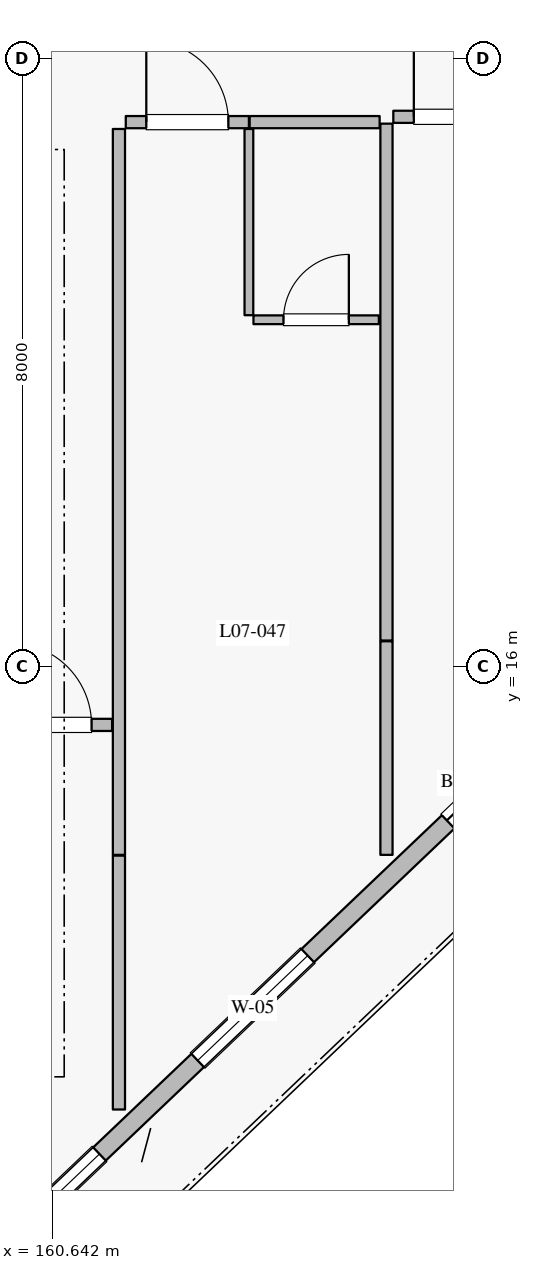
"""IFC4 building model, lengths in metres.
Left out: names, types, materials, properties, quantities, classifications, styles, units other than length and angle.
Written with IfcOpenShell. Run it as: python <this file> out.ifc"""

import sys

from ifc_helpers import new_model, si_unit, direction, frame, frame_2d, origin, place, context, subcontext, project, spatial, rectangle, extrude, element, fill, save


model = new_model("IFC4")
c1 = context("Model", 3, precision=1e-05, world=origin(), true_north=direction((0.0, 1.0)))
c2 = subcontext(c1, "Body", "Model", "MODEL_VIEW")
j1 = project(units=[si_unit("LENGTHUNIT", "METRE"), si_unit("PLANEANGLEUNIT", "RADIAN")], contexts=[c1])
p1 = place(None, origin())
s1 = spatial("IfcSite", under=j1, at=p1, CompositionType="ELEMENT")
p2 = place(p1, origin())
s2 = spatial("IfcBuilding", under=s1, at=p2, CompositionType="ELEMENT")
p3 = place(p2, frame((0.0, 0.0, 32.4)))
s3 = spatial("IfcBuildingStorey", under=s2, at=p3, CompositionType="ELEMENT", Elevation=32.4)
p4 = place(p3, frame((167.65, 15.667, 0.0), z_axis=(0.0, 0.0, 1.0), x_axis=(-0.724105170588, -0.689689569247, 0.0)))
e1 = element("IfcWall", 1, at=p4, inside=s3, PredefinedType="SOLIDWALL", context=c2, shape_type="SweptSolid", body=[
    extrude(rectangle(XDim=10.634, YDim=0.24, at=frame_2d((5.317, 0.0))), origin(), (0.0, 0.0, 1.0), 2.89),
])
p5 = place(p4, frame((0.983, 0.0, 0.0)))
e2 = element("IfcOpeningElement", 2, at=p5, cuts=e1, PredefinedType="OPENING", context=c2, shape_type="SweptSolid", body=[
    extrude(rectangle(XDim=1.5, YDim=2.25, at=frame_2d((0.75, 1.125))), frame((0.0, 0.13, 0.0), z_axis=(0.0, -1.0, 0.0), x_axis=(1.0, 0.0, 0.0)), (0.0, 0.0, 1.0), 0.26),
])
p6 = place(p4, frame((5.035, 0.0, 0.8)))
e3 = element("IfcOpeningElement", 3, at=p6, cuts=e1, PredefinedType="OPENING", context=c2, shape_type="SweptSolid", body=[
    extrude(rectangle(XDim=2.0, YDim=1.75, at=frame_2d((1.0, 0.875))), frame((0.0, 0.13, 0.0), z_axis=(0.0, -1.0, 0.0), x_axis=(1.0, 0.0, 0.0)), (0.0, 0.0, 1.0), 0.26),
])
p7 = place(p4, frame((8.819, 0.0, 0.8)))
e4 = element("IfcOpeningElement", 4, at=p7, cuts=e1, PredefinedType="OPENING", context=c2, shape_type="SweptSolid", body=[
    extrude(rectangle(XDim=1.6, YDim=1.6, at=frame_2d((0.8, 0.8))), frame((0.0, 0.13, 0.0), z_axis=(0.0, -1.0, 0.0), x_axis=(1.0, 0.0, 0.0)), (0.0, 0.0, 1.0), 0.26),
])
p8 = place(p3, frame((159.81, 15.23, 0.0), z_axis=(0.0, 0.0, 1.0), x_axis=(1.0, 0.0, 0.0)))
e5 = element("IfcWall", 5, at=p8, inside=s3, PredefinedType="PARTITIONING", context=c2, shape_type="SweptSolid", body=[
    extrude(rectangle(XDim=1.62, YDim=0.16, at=frame_2d((0.81, 0.0))), origin(), (0.0, 0.0, 1.0), 3.335),
])
p9 = place(p8, frame((0.27, 0.0, 0.0)))
e6 = element("IfcOpeningElement", 6, at=p9, cuts=e5, PredefinedType="OPENING", context=c2, shape_type="SweptSolid", body=[
    extrude(rectangle(XDim=1.08, YDim=2.3, at=frame_2d((0.54, 1.15))), frame((0.0, 0.09, 0.0), z_axis=(0.0, -1.0, 0.0), x_axis=(1.0, 0.0, 0.0)), (0.0, 0.0, 1.0), 0.18),
])
p10 = place(p3, frame((161.52, 10.17, 0.0), z_axis=(0.0, 0.0, 1.0), x_axis=(0.0, 1.0, 0.0)))
e7 = element("IfcWall", 7, at=p10, inside=s3, PredefinedType="PARTITIONING", context=c2, shape_type="SweptSolid", body=[
    extrude(rectangle(XDim=3.34, YDim=0.16, at=frame_2d((1.67, 0.0))), origin(), (0.0, 0.0, 1.0), 3.335),
])
p11 = place(p3, frame((161.61, 23.16, 0.0), z_axis=(0.0, 0.0, 1.0), x_axis=(1.0, 0.0, 0.0)))
e8 = element("IfcWall", 8, at=p11, inside=s3, PredefinedType="PARTITIONING", context=c2, shape_type="SweptSolid", body=[
    extrude(rectangle(XDim=1.62, YDim=0.16, at=frame_2d((0.81, 0.0))), origin(), (0.0, 0.0, 1.0), 3.335),
])
p12 = place(p11, frame((0.27, 0.0, 0.0)))
e9 = element("IfcOpeningElement", 9, at=p12, cuts=e8, PredefinedType="OPENING", context=c2, shape_type="SweptSolid", body=[
    extrude(rectangle(XDim=1.08, YDim=2.3, at=frame_2d((0.54, 1.15))), frame((0.0, 0.09, 0.0), z_axis=(0.0, -1.0, 0.0), x_axis=(1.0, 0.0, 0.0)), (0.0, 0.0, 1.0), 0.18),
])
p13 = place(p3, frame((163.24, 23.16, 0.0), z_axis=(0.0, 0.0, 1.0), x_axis=(1.0, 0.0, 0.0)))
e10 = element("IfcWall", 10, at=p13, inside=s3, PredefinedType="PARTITIONING", context=c2, shape_type="SweptSolid", body=[
    extrude(rectangle(XDim=1.71, YDim=0.16, at=frame_2d((0.855, 0.0))), origin(), (0.0, 0.0, 1.0), 3.335),
])
p14 = place(p3, frame((163.23, 20.62, 0.0), z_axis=(0.0, 0.0, 1.0), x_axis=(0.0, 1.0, 0.0)))
e11 = element("IfcWall", 11, at=p14, inside=s3, PredefinedType="PARTITIONING", context=c2, shape_type="SweptSolid", body=[
    extrude(rectangle(XDim=2.45, YDim=0.115, at=frame_2d((1.225, 0.0))), origin(), (0.0, 0.0, 1.0), 3.335),
])
p15 = place(p3, frame((163.29, 20.56, 0.0), z_axis=(0.0, 0.0, 1.0), x_axis=(1.0, 0.0, 0.0)))
e12 = element("IfcWall", 12, at=p15, inside=s3, PredefinedType="PARTITIONING", context=c2, shape_type="SweptSolid", body=[
    extrude(rectangle(XDim=1.65, YDim=0.115, at=frame_2d((0.825, 0.0))), origin(), (0.0, 0.0, 1.0), 3.335),
])
p16 = place(p15, frame((0.395, 0.0, 0.0)))
e13 = element("IfcOpeningElement", 13, at=p16, cuts=e12, PredefinedType="OPENING", context=c2, shape_type="SweptSolid", body=[
    extrude(rectangle(XDim=0.86, YDim=2.12, at=frame_2d((0.43, 1.06))), frame((0.0, 0.067, 0.0), z_axis=(0.0, -1.0, 0.0), x_axis=(1.0, 0.0, 0.0)), (0.0, 0.0, 1.0), 0.135),
])
p17 = place(p3, frame((161.52, 13.52, 0.0), z_axis=(0.0, 0.0, 1.0), x_axis=(0.0, 1.0, 0.0)))
e14 = element("IfcWall", 14, at=p17, inside=s3, PredefinedType="PARTITIONING", context=c2, shape_type="SweptSolid", body=[
    extrude(rectangle(XDim=9.55, YDim=0.16, at=frame_2d((4.775, 0.0))), origin(), (0.0, 0.0, 1.0), 3.335),
])
p18 = place(p3, frame((165.04, 13.52, 0.0), z_axis=(0.0, 0.0, 1.0), x_axis=(0.0, 1.0, 0.0)))
e15 = element("IfcWall", 15, at=p18, inside=s3, PredefinedType="PARTITIONING", context=c2, shape_type="SweptSolid", body=[
    extrude(rectangle(XDim=2.81, YDim=0.16, at=frame_2d((1.405, 0.0))), origin(), (0.0, 0.0, 1.0), 3.335),
])
p19 = place(p3, frame((165.13, 23.23, 0.0), z_axis=(0.0, 0.0, 1.0), x_axis=(1.0, 0.0, 0.0)))
e16 = element("IfcWall", 16, at=p19, inside=s3, PredefinedType="PARTITIONING", context=c2, shape_type="SweptSolid", body=[
    extrude(rectangle(XDim=1.62, YDim=0.16, at=frame_2d((0.81, 0.0))), origin(), (0.0, 0.0, 1.0), 3.335),
])
p20 = place(p19, frame((0.27, 0.0, 0.0)))
e17 = element("IfcOpeningElement", 17, at=p20, cuts=e16, PredefinedType="OPENING", context=c2, shape_type="SweptSolid", body=[
    extrude(rectangle(XDim=1.08, YDim=2.3, at=frame_2d((0.54, 1.15))), frame((0.0, 0.09, 0.0), z_axis=(0.0, -1.0, 0.0), x_axis=(1.0, 0.0, 0.0)), (0.0, 0.0, 1.0), 0.18),
])
p21 = place(p3, frame((165.04, 16.34, 0.0), z_axis=(0.0, 0.0, 1.0), x_axis=(0.0, 1.0, 0.0)))
e18 = element("IfcWall", 18, at=p21, inside=s3, PredefinedType="PARTITIONING", context=c2, shape_type="SweptSolid", body=[
    extrude(rectangle(XDim=6.8, YDim=0.16, at=frame_2d((3.4, 0.0))), origin(), (0.0, 0.0, 1.0), 3.335),
])
p22 = place(p5, origin())
e19 = element("IfcDoor", 19, at=p22, inside=s3, OperationType="SLIDING_TO_LEFT", PredefinedType="DOOR", context=c2, shape_type="SweptSolid", body=[
    extrude(rectangle(XDim=1.5, YDim=2.25, at=frame_2d((0.75, 1.125))), frame((0.0, 0.025, 0.0), z_axis=(0.0, -1.0, 0.0), x_axis=(1.0, 0.0, 0.0)), (0.0, 0.0, 1.0), 0.05),
])
fill(e2, e19)
p23 = place(p6, origin())
e20 = element("IfcWindow", 20, at=p23, inside=s3, PartitioningType="DOUBLE_PANEL_VERTICAL", PredefinedType="WINDOW", context=c2, shape_type="SweptSolid", body=[
    extrude(rectangle(XDim=2.0, YDim=1.75, at=frame_2d((1.0, 0.875))), frame((0.0, 0.03, 0.0), z_axis=(0.0, -1.0, 0.0), x_axis=(1.0, 0.0, 0.0)), (0.0, 0.0, 1.0), 0.06),
])
fill(e3, e20)
p24 = place(p7, origin())
e21 = element("IfcWindow", 21, at=p24, inside=s3, PartitioningType="SINGLE_PANEL", PredefinedType="WINDOW", context=c2, shape_type="SweptSolid", body=[
    extrude(rectangle(XDim=1.6, YDim=1.6, at=frame_2d((0.8, 0.8))), frame((0.0, 0.03, 0.0), z_axis=(0.0, -1.0, 0.0), x_axis=(1.0, 0.0, 0.0)), (0.0, 0.0, 1.0), 0.06),
])
fill(e4, e21)
p25 = place(p9, origin())
e22 = element("IfcDoor", 22, at=p25, inside=s3, OperationType="SINGLE_SWING_LEFT", PredefinedType="DOOR", context=c2, shape_type="SweptSolid", body=[
    extrude(rectangle(XDim=1.08, YDim=2.3, at=frame_2d((0.54, 1.15))), frame((0.0, 0.025, 0.0), z_axis=(0.0, -1.0, 0.0), x_axis=(1.0, 0.0, 0.0)), (0.0, 0.0, 1.0), 0.05),
])
fill(e6, e22)
p26 = place(p12, origin())
e23 = element("IfcDoor", 23, at=p26, inside=s3, OperationType="SINGLE_SWING_LEFT", PredefinedType="DOOR", context=c2, shape_type="SweptSolid", body=[
    extrude(rectangle(XDim=1.08, YDim=2.3, at=frame_2d((0.54, 1.15))), frame((0.0, 0.025, 0.0), z_axis=(0.0, -1.0, 0.0), x_axis=(1.0, 0.0, 0.0)), (0.0, 0.0, 1.0), 0.05),
])
fill(e9, e23)
p27 = place(p16, origin())
e24 = element("IfcDoor", 24, at=p27, inside=s3, OperationType="SINGLE_SWING_RIGHT", PredefinedType="DOOR", context=c2, shape_type="SweptSolid", body=[
    extrude(rectangle(XDim=0.86, YDim=2.12, at=frame_2d((0.43, 1.06))), frame((0.0, 0.025, 0.0), z_axis=(0.0, -1.0, 0.0), x_axis=(1.0, 0.0, 0.0)), (0.0, 0.0, 1.0), 0.05),
])
fill(e13, e24)
p28 = place(p20, origin())
e25 = element("IfcDoor", 25, at=p28, inside=s3, OperationType="SINGLE_SWING_LEFT", PredefinedType="DOOR", context=c2, shape_type="SweptSolid", body=[
    extrude(rectangle(XDim=1.08, YDim=2.3, at=frame_2d((0.54, 1.15))), frame((0.0, 0.025, 0.0), z_axis=(0.0, -1.0, 0.0), x_axis=(1.0, 0.0, 0.0)), (0.0, 0.0, 1.0), 0.05),
])
fill(e17, e25)
save(model, sys.argv[1])
